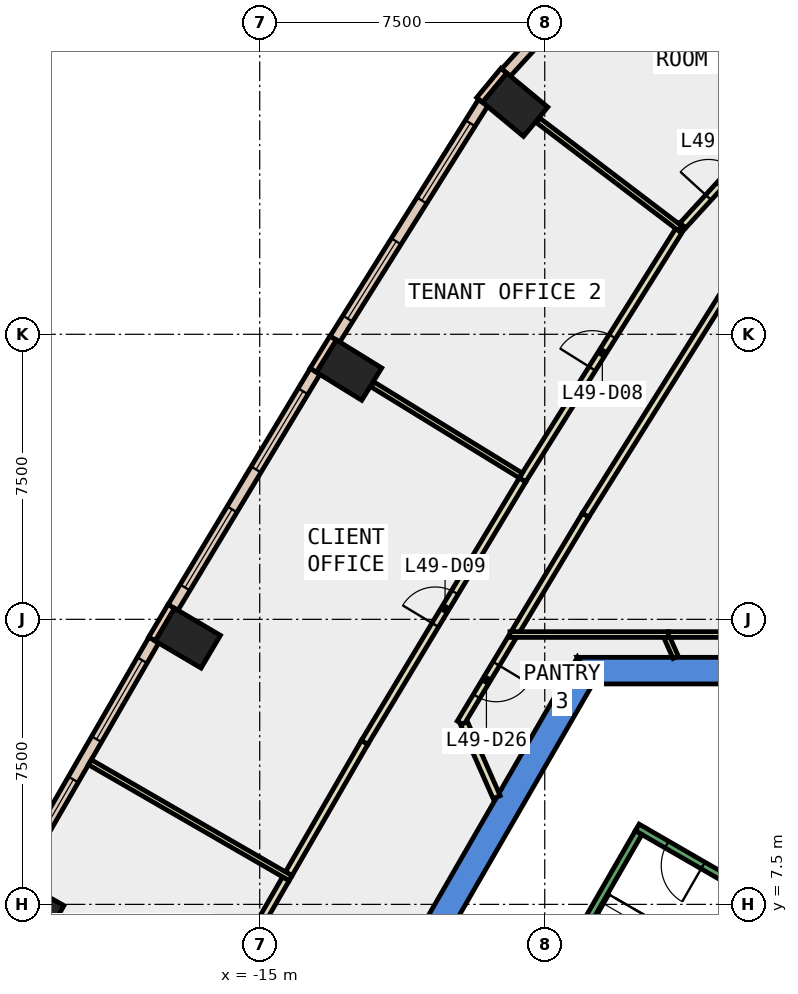
"""IFC4 building model, lengths in metres.
Left out: names, types, materials, properties, quantities, classifications, styles, units other than length and angle.
Written with IfcOpenShell. Run it as: python <this file> out.ifc"""

import sys

from ifc_helpers import new_model, si_unit, direction, frame, frame_2d, origin, origin_2d, place, context, subcontext, project, spatial, polyline, rectangle, outline, extrude, element, fill, save


model = new_model("IFC4")
c1 = context("Model", 3, precision=1e-05, world=origin(), true_north=direction((0.0, 1.0)))
c2 = subcontext(c1, "Body", "Model", "MODEL_VIEW")
j1 = project(units=[si_unit("LENGTHUNIT", "METRE"), si_unit("PLANEANGLEUNIT", "RADIAN")], contexts=[c1])
p1 = place(None, origin())
s1 = spatial("IfcSite", under=j1, at=p1, CompositionType="ELEMENT")
p2 = place(p1, origin())
s2 = spatial("IfcBuilding", under=s1, at=p2, CompositionType="ELEMENT")
p3 = place(p2, frame((0.0, 0.0, 219.2)))
s3 = spatial("IfcBuildingStorey", under=s2, at=p3, CompositionType="ELEMENT", Elevation=219.2)
for number, where, z_axis, x_axis in (
    (1, (-8.278, 28.54, -0.4), (0.0, 0.0, 1.0), (0.639, 0.769, 0.0)),
    (2, (-12.648, 21.557, -0.4), (0.0, 0.0, 1.0), (0.525, 0.851, 0.0)),
    (3, (-16.892, 14.504, -0.4), (0.0, 0.0, 1.0), (0.509, 0.861, 0.0)),
    (4, (-21.007, 7.377, -0.4), (0.0, 0.0, 1.0), (0.491, 0.871, 0.0)),
):
    element("IfcColumn", number, at=place(p3, frame(where, z_axis=z_axis, x_axis=x_axis)), inside=s3, PredefinedType="COLUMN", context=c2, shape_type="SweptSolid", body=[
        extrude(rectangle(XDim=1.0, YDim=1.4, at=origin_2d()), origin(), (0.0, 0.0, 1.0), 4.2),
    ])
p4 = place(p3, frame((0.0, 0.0, -0.4)))
e5 = element("IfcWall", 5, at=p4, inside=s3, PredefinedType="SHEAR", context=c2, shape_type="SweptSolid", body=[
    extrude(outline(polyline([(6.64, 14.0), (-6.64, 14.0), (-6.235, 13.3), (6.235, 13.3), (6.64, 14.0)])), origin(), (0.0, 0.0, 1.0), 4.2),
])
p5 = place(p3, frame((0.0, 0.0, -0.4)))
e6 = element("IfcWall", 6, at=p5, inside=s3, PredefinedType="SHEAR", context=c2, shape_type="SweptSolid", body=[
    extrude(outline(polyline([(-11.834, 5.002), (-11.228, 4.652), (-6.235, 13.3), (-6.64, 14.0), (-11.834, 5.002)])), origin(), (0.0, 0.0, 1.0), 4.2),
])
p6 = place(p3, frame((-8.575, 29.436, 0.0), z_axis=(0.0, 0.0, 1.0), x_axis=(-0.637972365578, -0.770059257953, 0.0)))
e7 = element("IfcWall", 7, at=p6, inside=s3, PredefinedType="STANDARD", context=c2, shape_type="SweptSolid", body=[
    extrude(rectangle(XDim=1.0, YDim=0.2, at=frame_2d((0.5, 0.0))), origin(), (0.0, 0.0, 1.0), 3.8),
])
p7 = place(p3, frame((-13.066, 22.403, 0.0), z_axis=(0.0, 0.0, 1.0), x_axis=(-0.525825307325, -0.850592585306, 0.0)))
e8 = element("IfcWall", 8, at=p7, inside=s3, PredefinedType="STANDARD", context=c2, shape_type="SweptSolid", body=[
    extrude(rectangle(XDim=1.0, YDim=0.2, at=frame_2d((0.5, 0.0))), origin(), (0.0, 0.0, 1.0), 3.8),
])
p8 = place(p3, frame((-17.327, 15.342, 0.0), z_axis=(0.0, 0.0, 1.0), x_axis=(-0.508161541526, -0.861261776531, 0.0)))
e9 = element("IfcWall", 9, at=p8, inside=s3, PredefinedType="STANDARD", context=c2, shape_type="SweptSolid", body=[
    extrude(rectangle(XDim=1.0, YDim=0.2, at=frame_2d((0.5, 0.0))), origin(), (0.0, 0.0, 1.0), 3.8),
])
p9 = place(p3, frame((-5.653, 32.524, 0.0), z_axis=(0.0, 0.0, 1.0), x_axis=(-0.674487390017, -0.738286367684, 0.0)))
e10 = element("IfcWall", 10, at=p9, inside=s3, PredefinedType="STANDARD", context=c2, shape_type="SweptSolid", body=[
    extrude(rectangle(XDim=4.248, YDim=0.3, at=frame_2d((2.124, 0.0))), origin(), (0.0, 0.0, 1.0), 3.8),
])
p10 = place(p9, frame((1.424, 0.0, 0.9)))
e11 = element("IfcOpeningElement", 11, at=p10, cuts=e10, PredefinedType="OPENING", context=c2, shape_type="SweptSolid", body=[
    extrude(rectangle(XDim=1.4, YDim=2.6, at=frame_2d((0.7, 1.3))), frame((0.0, 0.16, 0.0), z_axis=(0.0, -1.0, 0.0), x_axis=(1.0, 0.0, 0.0)), (0.0, 0.0, 1.0), 0.32),
])
p11 = place(p3, frame((-9.122, 28.592, 0.0), z_axis=(0.0, 0.0, 1.0), x_axis=(-0.531239262679, -0.847221839773, 0.0)))
e12 = element("IfcWall", 12, at=p11, inside=s3, PredefinedType="STANDARD", context=c2, shape_type="SweptSolid", body=[
    extrude(rectangle(XDim=7.339, YDim=0.3, at=frame_2d((3.67, 0.0))), origin(), (0.0, 0.0, 1.0), 3.8),
])
p12 = place(p11, frame((0.635, 0.0, 0.9)))
e13 = element("IfcOpeningElement", 13, at=p12, cuts=e12, PredefinedType="OPENING", context=c2, shape_type="SweptSolid", body=[
    extrude(rectangle(XDim=2.4, YDim=2.6, at=frame_2d((1.2, 1.3))), frame((0.0, 0.16, 0.0), z_axis=(0.0, -1.0, 0.0), x_axis=(1.0, 0.0, 0.0)), (0.0, 0.0, 1.0), 0.32),
])
p13 = place(p11, frame((4.304, 0.0, 0.9)))
e14 = element("IfcOpeningElement", 14, at=p13, cuts=e12, PredefinedType="OPENING", context=c2, shape_type="SweptSolid", body=[
    extrude(rectangle(XDim=2.4, YDim=2.6, at=frame_2d((1.2, 1.3))), frame((0.0, 0.16, 0.0), z_axis=(0.0, -1.0, 0.0), x_axis=(1.0, 0.0, 0.0)), (0.0, 0.0, 1.0), 0.32),
])
p14 = place(p3, frame((-13.544, 21.524, 0.0), z_axis=(0.0, 0.0, 1.0), x_axis=(-0.515560283412, -0.856853309597, 0.0)))
e15 = element("IfcWall", 15, at=p14, inside=s3, PredefinedType="STANDARD", context=c2, shape_type="SweptSolid", body=[
    extrude(rectangle(XDim=7.249, YDim=0.3, at=frame_2d((3.624, 0.0))), origin(), (0.0, 0.0, 1.0), 3.8),
])
p15 = place(p14, frame((0.612, 0.0, 0.9)))
e16 = element("IfcOpeningElement", 16, at=p15, cuts=e15, PredefinedType="OPENING", context=c2, shape_type="SweptSolid", body=[
    extrude(rectangle(XDim=2.4, YDim=2.6, at=frame_2d((1.2, 1.3))), frame((0.0, 0.16, 0.0), z_axis=(0.0, -1.0, 0.0), x_axis=(1.0, 0.0, 0.0)), (0.0, 0.0, 1.0), 0.32),
])
p16 = place(p14, frame((4.236, 0.0, 0.9)))
e17 = element("IfcOpeningElement", 17, at=p16, cuts=e15, PredefinedType="OPENING", context=c2, shape_type="SweptSolid", body=[
    extrude(rectangle(XDim=2.4, YDim=2.6, at=frame_2d((1.2, 1.3))), frame((0.0, 0.16, 0.0), z_axis=(0.0, -1.0, 0.0), x_axis=(1.0, 0.0, 0.0)), (0.0, 0.0, 1.0), 0.32),
])
p17 = place(p3, frame((-17.787, 14.454, 0.0), z_axis=(0.0, 0.0, 1.0), x_axis=(-0.499968351115, -0.866043675505, 0.0)))
e18 = element("IfcWall", 18, at=p17, inside=s3, PredefinedType="STANDARD", context=c2, shape_type="SweptSolid", body=[
    extrude(rectangle(XDim=7.248, YDim=0.3, at=frame_2d((3.624, 0.0))), origin(), (0.0, 0.0, 1.0), 3.8),
])
p18 = place(p17, frame((0.612, 0.0, 0.9)))
e19 = element("IfcOpeningElement", 19, at=p18, cuts=e18, PredefinedType="OPENING", context=c2, shape_type="SweptSolid", body=[
    extrude(rectangle(XDim=2.4, YDim=2.6, at=frame_2d((1.2, 1.3))), frame((0.0, 0.16, 0.0), z_axis=(0.0, -1.0, 0.0), x_axis=(1.0, 0.0, 0.0)), (0.0, 0.0, 1.0), 0.32),
])
p19 = place(p17, frame((4.236, 0.0, 0.9)))
e20 = element("IfcOpeningElement", 20, at=p19, cuts=e18, PredefinedType="OPENING", context=c2, shape_type="SweptSolid", body=[
    extrude(rectangle(XDim=2.4, YDim=2.6, at=frame_2d((1.2, 1.3))), frame((0.0, 0.16, 0.0), z_axis=(0.0, -1.0, 0.0), x_axis=(1.0, 0.0, 0.0)), (0.0, 0.0, 1.0), 0.32),
])
p20 = place(p3, frame((-8.353, 14.536, 0.0), z_axis=(0.0, 0.0, 1.0), x_axis=(-0.515636196259, -0.856807628997, 0.0)))
e21 = element("IfcWall", 21, at=p20, inside=s3, PredefinedType="PARTITIONING", context=c2, shape_type="SweptSolid", body=[
    extrude(rectangle(XDim=2.643, YDim=0.2, at=frame_2d((1.322, 0.0))), origin(), (0.0, 0.0, 1.0), 3.8),
])
p21 = place(p20, frame((0.822, 0.0, 0.0)))
e22 = element("IfcOpeningElement", 22, at=p21, cuts=e21, PredefinedType="OPENING", context=c2, shape_type="SweptSolid", body=[
    extrude(rectangle(XDim=1.0, YDim=2.1, at=frame_2d((0.5, 1.05))), frame((0.0, 0.11, 0.0), z_axis=(0.0, -1.0, 0.0), x_axis=(1.0, 0.0, 0.0)), (0.0, 0.0, 1.0), 0.22),
])
p22 = place(p3, frame((-9.624, 12.265, 0.0), z_axis=(0.0, 0.0, 1.0), x_axis=(0.404081180606, -0.914723127225, 0.0)))
e23 = element("IfcWall", 23, at=p22, inside=s3, PredefinedType="PARTITIONING", context=c2, shape_type="SweptSolid", body=[
    extrude(rectangle(XDim=2.126, YDim=0.2, at=frame_2d((1.063, 0.0))), origin(), (0.0, 0.0, 1.0), 3.8),
])
p23 = place(p3, frame((-2.364, 24.216, 0.0), z_axis=(0.0, 0.0, 1.0), x_axis=(-0.531335643981, -0.847161397512, 0.0)))
e24 = element("IfcWall", 24, at=p23, inside=s3, PredefinedType="PARTITIONING", context=c2, shape_type="SweptSolid", body=[
    extrude(rectangle(XDim=7.647, YDim=0.2, at=frame_2d((3.823, 0.0))), origin(), (0.0, 0.0, 1.0), 3.8),
])
p24 = place(p3, frame((-6.427, 17.738, 0.0), z_axis=(0.0, 0.0, 1.0), x_axis=(-0.515416266777, -0.85693994652, 0.0)))
e25 = element("IfcWall", 25, at=p24, inside=s3, PredefinedType="PARTITIONING", context=c2, shape_type="SweptSolid", body=[
    extrude(rectangle(XDim=3.587, YDim=0.2, at=frame_2d((1.793, 0.0))), origin(), (0.0, 0.0, 1.0), 3.8),
])
p25 = place(p3, frame((-3.869, 25.36, 0.0), z_axis=(0.0, 0.0, 1.0), x_axis=(0.674594755709, 0.738188265668, 0.0)))
e26 = element("IfcWall", 26, at=p25, inside=s3, PredefinedType="PARTITIONING", context=c2, shape_type="SweptSolid", body=[
    extrude(rectangle(XDim=3.006, YDim=0.2, at=frame_2d((1.503, 0.0))), origin(), (0.0, 0.0, 1.0), 3.8),
])
p26 = place(p25, frame((1.003, 0.0, 0.0)))
e27 = element("IfcOpeningElement", 27, at=p26, cuts=e26, PredefinedType="OPENING", context=c2, shape_type="SweptSolid", body=[
    extrude(rectangle(XDim=1.0, YDim=2.1, at=frame_2d((0.5, 1.05))), frame((0.0, 0.11, 0.0), z_axis=(0.0, -1.0, 0.0), x_axis=(1.0, 0.0, 0.0)), (0.0, 0.0, 1.0), 0.22),
])
p27 = place(p3, frame((-8.086, 18.669, 0.0), z_axis=(0.0, 0.0, 1.0), x_axis=(0.531329962263, 0.847164961033, 0.0)))
e28 = element("IfcWall", 28, at=p27, inside=s3, PredefinedType="PARTITIONING", context=c2, shape_type="SweptSolid", body=[
    extrude(rectangle(XDim=7.91, YDim=0.2, at=frame_2d((3.955, 0.0))), origin(), (0.0, 0.0, 1.0), 3.8),
])
p28 = place(p27, frame((3.455, 0.0, 0.0)))
e29 = element("IfcOpeningElement", 29, at=p28, cuts=e28, PredefinedType="OPENING", context=c2, shape_type="SweptSolid", body=[
    extrude(rectangle(XDim=1.0, YDim=2.1, at=frame_2d((0.5, 1.05))), frame((0.0, 0.11, 0.0), z_axis=(0.0, -1.0, 0.0), x_axis=(1.0, 0.0, 0.0)), (0.0, 0.0, 1.0), 0.22),
])
p29 = place(p3, frame((-14.236, 8.305, 0.0), z_axis=(0.0, 0.0, 1.0), x_axis=(0.500110539333, 0.865961574464, 0.0)))
e30 = element("IfcWall", 30, at=p29, inside=s3, PredefinedType="PARTITIONING", context=c2, shape_type="SweptSolid", body=[
    extrude(rectangle(XDim=3.993, YDim=0.2, at=frame_2d((1.997, 0.0))), origin(), (0.0, 0.0, 1.0), 3.8),
])
p30 = place(p3, frame((-12.239, 11.763, 0.0), z_axis=(0.0, 0.0, 1.0), x_axis=(0.515591302858, 0.856834644734, 0.0)))
e31 = element("IfcWall", 31, at=p30, inside=s3, PredefinedType="PARTITIONING", context=c2, shape_type="SweptSolid", body=[
    extrude(rectangle(XDim=8.059, YDim=0.2, at=frame_2d((4.029, 0.0))), origin(), (0.0, 0.0, 1.0), 3.8),
])
p31 = place(p30, frame((3.604, 0.0, 0.0)))
e32 = element("IfcOpeningElement", 32, at=p31, cuts=e31, PredefinedType="OPENING", context=c2, shape_type="SweptSolid", body=[
    extrude(rectangle(XDim=1.0, YDim=2.1, at=frame_2d((0.5, 1.05))), frame((0.0, 0.11, 0.0), z_axis=(0.0, -1.0, 0.0), x_axis=(1.0, 0.0, 0.0)), (0.0, 0.0, 1.0), 0.22),
])
p32 = place(p3, frame((-16.306, 4.718, 0.0), z_axis=(0.0, 0.0, 1.0), x_axis=(0.499803646539, 0.866138738832, 0.0)))
e33 = element("IfcWall", 33, at=p32, inside=s3, PredefinedType="PARTITIONING", context=c2, shape_type="SweptSolid", body=[
    extrude(rectangle(XDim=3.991, YDim=0.2, at=frame_2d((1.996, 0.0))), origin(), (0.0, 0.0, 1.0), 3.8),
])
p33 = place(p3, frame((-4.055, 14.0, 0.0), z_axis=(0.0, 0.0, 1.0), x_axis=(-0.404850841056, 0.914382740703, 0.0)))
e34 = element("IfcWall", 34, at=p33, inside=s3, PredefinedType="PARTITIONING", context=c2, shape_type="SweptSolid", body=[
    extrude(rectangle(XDim=0.581, YDim=0.15, at=frame_2d((0.291, 0.0))), origin(), (0.0, 0.0, 1.0), 3.8),
])
p34 = place(p3, frame((-4.245, 14.6, 0.0), z_axis=(0.0, 0.0, 1.0), x_axis=(-1.0, 0.0, 0.0)))
e35 = element("IfcWall", 35, at=p34, inside=s3, PredefinedType="PARTITIONING", context=c2, shape_type="SweptSolid", body=[
    extrude(rectangle(XDim=4.17, YDim=0.15, at=frame_2d((2.085, 0.0))), origin(), (0.0, 0.0, 1.0), 3.8),
])
p35 = place(p3, frame((-3.936, 25.286, 0.0), z_axis=(0.0, 0.0, 1.0), x_axis=(-0.795977117067, 0.605326712698, 0.0)))
e36 = element("IfcWall", 36, at=p35, inside=s3, PredefinedType="PARTITIONING", context=c2, shape_type="SweptSolid", body=[
    extrude(rectangle(XDim=4.704, YDim=0.15, at=frame_2d((2.352, 0.0))), origin(), (0.0, 0.0, 1.0), 3.8),
])
p36 = place(p3, frame((-8.131, 18.784, 0.0), z_axis=(0.0, 0.0, 1.0), x_axis=(-0.851969320918, 0.52359170755, 0.0)))
e37 = element("IfcWall", 37, at=p36, inside=s3, PredefinedType="PARTITIONING", context=c2, shape_type="SweptSolid", body=[
    extrude(rectangle(XDim=4.58, YDim=0.15, at=frame_2d((2.29, 0.0))), origin(), (0.0, 0.0, 1.0), 3.8),
])
p37 = place(p3, frame((-14.187, 8.19, 0.0), z_axis=(0.0, 0.0, 1.0), x_axis=(-0.865990270311, 0.500060848024, 0.0)))
e38 = element("IfcWall", 38, at=p37, inside=s3, PredefinedType="PARTITIONING", context=c2, shape_type="SweptSolid", body=[
    extrude(rectangle(XDim=6.099, YDim=0.15, at=frame_2d((3.05, 0.0))), origin(), (0.0, 0.0, 1.0), 3.8),
])
p38 = place(p3, frame((-0.4, 14.6, 0.0), z_axis=(0.0, 0.0, 1.0), x_axis=(-1.0, 0.0, 0.0)))
e39 = element("IfcWall", 39, at=p38, inside=s3, PredefinedType="PARTITIONING", context=c2, shape_type="SweptSolid", body=[
    extrude(rectangle(XDim=3.845, YDim=0.15, at=frame_2d((1.923, 0.0))), origin(), (0.0, 0.0, 1.0), 3.8),
])
p39 = place(p3, frame((-1.256, 7.324, 0.0), z_axis=(0.0, 0.0, 1.0), x_axis=(-0.866046073146, 0.499964197906, 0.0)))
e40 = element("IfcWall", 40, at=p39, inside=s3, PredefinedType="STANDARD", context=c2, shape_type="SweptSolid", body=[
    extrude(rectangle(XDim=4.4, YDim=0.2, at=frame_2d((2.2, 0.0))), origin(), (0.0, 0.0, 1.0), 3.8),
])
p40 = place(p39, frame((2.4, 0.0, 0.0)))
e41 = element("IfcOpeningElement", 41, at=p40, cuts=e40, PredefinedType="OPENING", context=c2, shape_type="SweptSolid", body=[
    extrude(rectangle(XDim=1.1, YDim=2.2, at=frame_2d((0.55, 1.1))), frame((0.0, 0.11, 0.0), z_axis=(0.0, -1.0, 0.0), x_axis=(1.0, 0.0, 0.0)), (0.0, 0.0, 1.0), 0.22),
])
p41 = place(p3, frame((-1.393, 7.288, 0.0), z_axis=(0.0, 0.0, 1.0), x_axis=(-0.499963383562, -0.866046543262, 0.0)))
e42 = element("IfcWall", 42, at=p41, inside=s3, PredefinedType="STANDARD", context=c2, shape_type="SweptSolid", body=[
    extrude(rectangle(XDim=6.9, YDim=0.2, at=frame_2d((3.45, 0.0))), origin(), (0.0, 0.0, 1.0), 3.8),
])
p42 = place(p41, frame((0.45, 0.0, 0.0)))
e43 = element("IfcOpeningElement", 43, at=p42, cuts=e42, PredefinedType="OPENING", context=c2, shape_type="SweptSolid", body=[
    extrude(rectangle(XDim=1.1, YDim=2.2, at=frame_2d((0.55, 1.1))), frame((0.0, 0.11, 0.0), z_axis=(0.0, -1.0, 0.0), x_axis=(1.0, 0.0, 0.0)), (0.0, 0.0, 1.0), 0.22),
])
p43 = place(p3, frame((-5.03, 9.388, 0.0), z_axis=(0.0, 0.0, 1.0), x_axis=(-0.499978703459, -0.866037698999, 0.0)))
e44 = element("IfcWall", 44, at=p43, inside=s3, PredefinedType="STANDARD", context=c2, shape_type="SweptSolid", body=[
    extrude(rectangle(XDim=6.9, YDim=0.2, at=frame_2d((3.45, 0.0))), origin(), (0.0, 0.0, 1.0), 3.8),
])
p44 = place(p12, origin())
e45 = element("IfcWindow", 45, at=p44, inside=s3, PartitioningType="SINGLE_PANEL", PredefinedType="WINDOW", context=c2, shape_type="SweptSolid", body=[
    extrude(rectangle(XDim=2.4, YDim=2.6, at=frame_2d((1.2, 1.3))), frame((0.0, 0.03, 0.0), z_axis=(0.0, -1.0, 0.0), x_axis=(1.0, 0.0, 0.0)), (0.0, 0.0, 1.0), 0.06),
])
fill(e13, e45)
p45 = place(p13, origin())
e46 = element("IfcWindow", 46, at=p45, inside=s3, PartitioningType="SINGLE_PANEL", PredefinedType="WINDOW", context=c2, shape_type="SweptSolid", body=[
    extrude(rectangle(XDim=2.4, YDim=2.6, at=frame_2d((1.2, 1.3))), frame((0.0, 0.03, 0.0), z_axis=(0.0, -1.0, 0.0), x_axis=(1.0, 0.0, 0.0)), (0.0, 0.0, 1.0), 0.06),
])
fill(e14, e46)
p46 = place(p15, origin())
e47 = element("IfcWindow", 47, at=p46, inside=s3, PartitioningType="SINGLE_PANEL", PredefinedType="WINDOW", context=c2, shape_type="SweptSolid", body=[
    extrude(rectangle(XDim=2.4, YDim=2.6, at=frame_2d((1.2, 1.3))), frame((0.0, 0.03, 0.0), z_axis=(0.0, -1.0, 0.0), x_axis=(1.0, 0.0, 0.0)), (0.0, 0.0, 1.0), 0.06),
])
fill(e16, e47)
p47 = place(p16, origin())
e48 = element("IfcWindow", 48, at=p47, inside=s3, PartitioningType="SINGLE_PANEL", PredefinedType="WINDOW", context=c2, shape_type="SweptSolid", body=[
    extrude(rectangle(XDim=2.4, YDim=2.6, at=frame_2d((1.2, 1.3))), frame((0.0, 0.03, 0.0), z_axis=(0.0, -1.0, 0.0), x_axis=(1.0, 0.0, 0.0)), (0.0, 0.0, 1.0), 0.06),
])
fill(e17, e48)
p48 = place(p18, origin())
e49 = element("IfcWindow", 49, at=p48, inside=s3, PartitioningType="SINGLE_PANEL", PredefinedType="WINDOW", context=c2, shape_type="SweptSolid", body=[
    extrude(rectangle(XDim=2.4, YDim=2.6, at=frame_2d((1.2, 1.3))), frame((0.0, 0.03, 0.0), z_axis=(0.0, -1.0, 0.0), x_axis=(1.0, 0.0, 0.0)), (0.0, 0.0, 1.0), 0.06),
])
fill(e19, e49)
p49 = place(p19, origin())
e50 = element("IfcWindow", 50, at=p49, inside=s3, PartitioningType="SINGLE_PANEL", PredefinedType="WINDOW", context=c2, shape_type="SweptSolid", body=[
    extrude(rectangle(XDim=2.4, YDim=2.6, at=frame_2d((1.2, 1.3))), frame((0.0, 0.03, 0.0), z_axis=(0.0, -1.0, 0.0), x_axis=(1.0, 0.0, 0.0)), (0.0, 0.0, 1.0), 0.06),
])
fill(e20, e50)
p50 = place(p26, origin())
e51 = element("IfcDoor", 51, at=p50, inside=s3, OperationType="SINGLE_SWING_LEFT", PredefinedType="DOOR", context=c2, shape_type="SweptSolid", body=[
    extrude(rectangle(XDim=1.0, YDim=2.1, at=frame_2d((0.5, 1.05))), frame((0.0, 0.025, 0.0), z_axis=(0.0, -1.0, 0.0), x_axis=(1.0, 0.0, 0.0)), (0.0, 0.0, 1.0), 0.05),
])
fill(e27, e51)
p51 = place(p28, origin())
e52 = element("IfcDoor", 52, at=p51, inside=s3, OperationType="SINGLE_SWING_RIGHT", PredefinedType="DOOR", context=c2, shape_type="SweptSolid", body=[
    extrude(rectangle(XDim=1.0, YDim=2.1, at=frame_2d((0.5, 1.05))), frame((0.0, 0.025, 0.0), z_axis=(0.0, -1.0, 0.0), x_axis=(1.0, 0.0, 0.0)), (0.0, 0.0, 1.0), 0.05),
])
fill(e29, e52)
p52 = place(p31, origin())
e53 = element("IfcDoor", 53, at=p52, inside=s3, OperationType="SINGLE_SWING_RIGHT", PredefinedType="DOOR", context=c2, shape_type="SweptSolid", body=[
    extrude(rectangle(XDim=1.0, YDim=2.1, at=frame_2d((0.5, 1.05))), frame((0.0, 0.025, 0.0), z_axis=(0.0, -1.0, 0.0), x_axis=(1.0, 0.0, 0.0)), (0.0, 0.0, 1.0), 0.05),
])
fill(e32, e53)
p53 = place(p21, origin())
e54 = element("IfcDoor", 54, at=p53, inside=s3, OperationType="SINGLE_SWING_LEFT", PredefinedType="DOOR", context=c2, shape_type="SweptSolid", body=[
    extrude(rectangle(XDim=1.0, YDim=2.1, at=frame_2d((0.5, 1.05))), frame((0.0, 0.025, 0.0), z_axis=(0.0, -1.0, 0.0), x_axis=(1.0, 0.0, 0.0)), (0.0, 0.0, 1.0), 0.05),
])
fill(e22, e54)
p54 = place(p40, origin())
e55 = element("IfcDoor", 55, at=p54, inside=s3, OperationType="SINGLE_SWING_LEFT", PredefinedType="DOOR", context=c2, shape_type="SweptSolid", body=[
    extrude(rectangle(XDim=1.1, YDim=2.2, at=frame_2d((0.55, 1.1))), frame((0.0, 0.025, 0.0), z_axis=(0.0, -1.0, 0.0), x_axis=(1.0, 0.0, 0.0)), (0.0, 0.0, 1.0), 0.05),
])
fill(e41, e55)
save(model, sys.argv[1])
